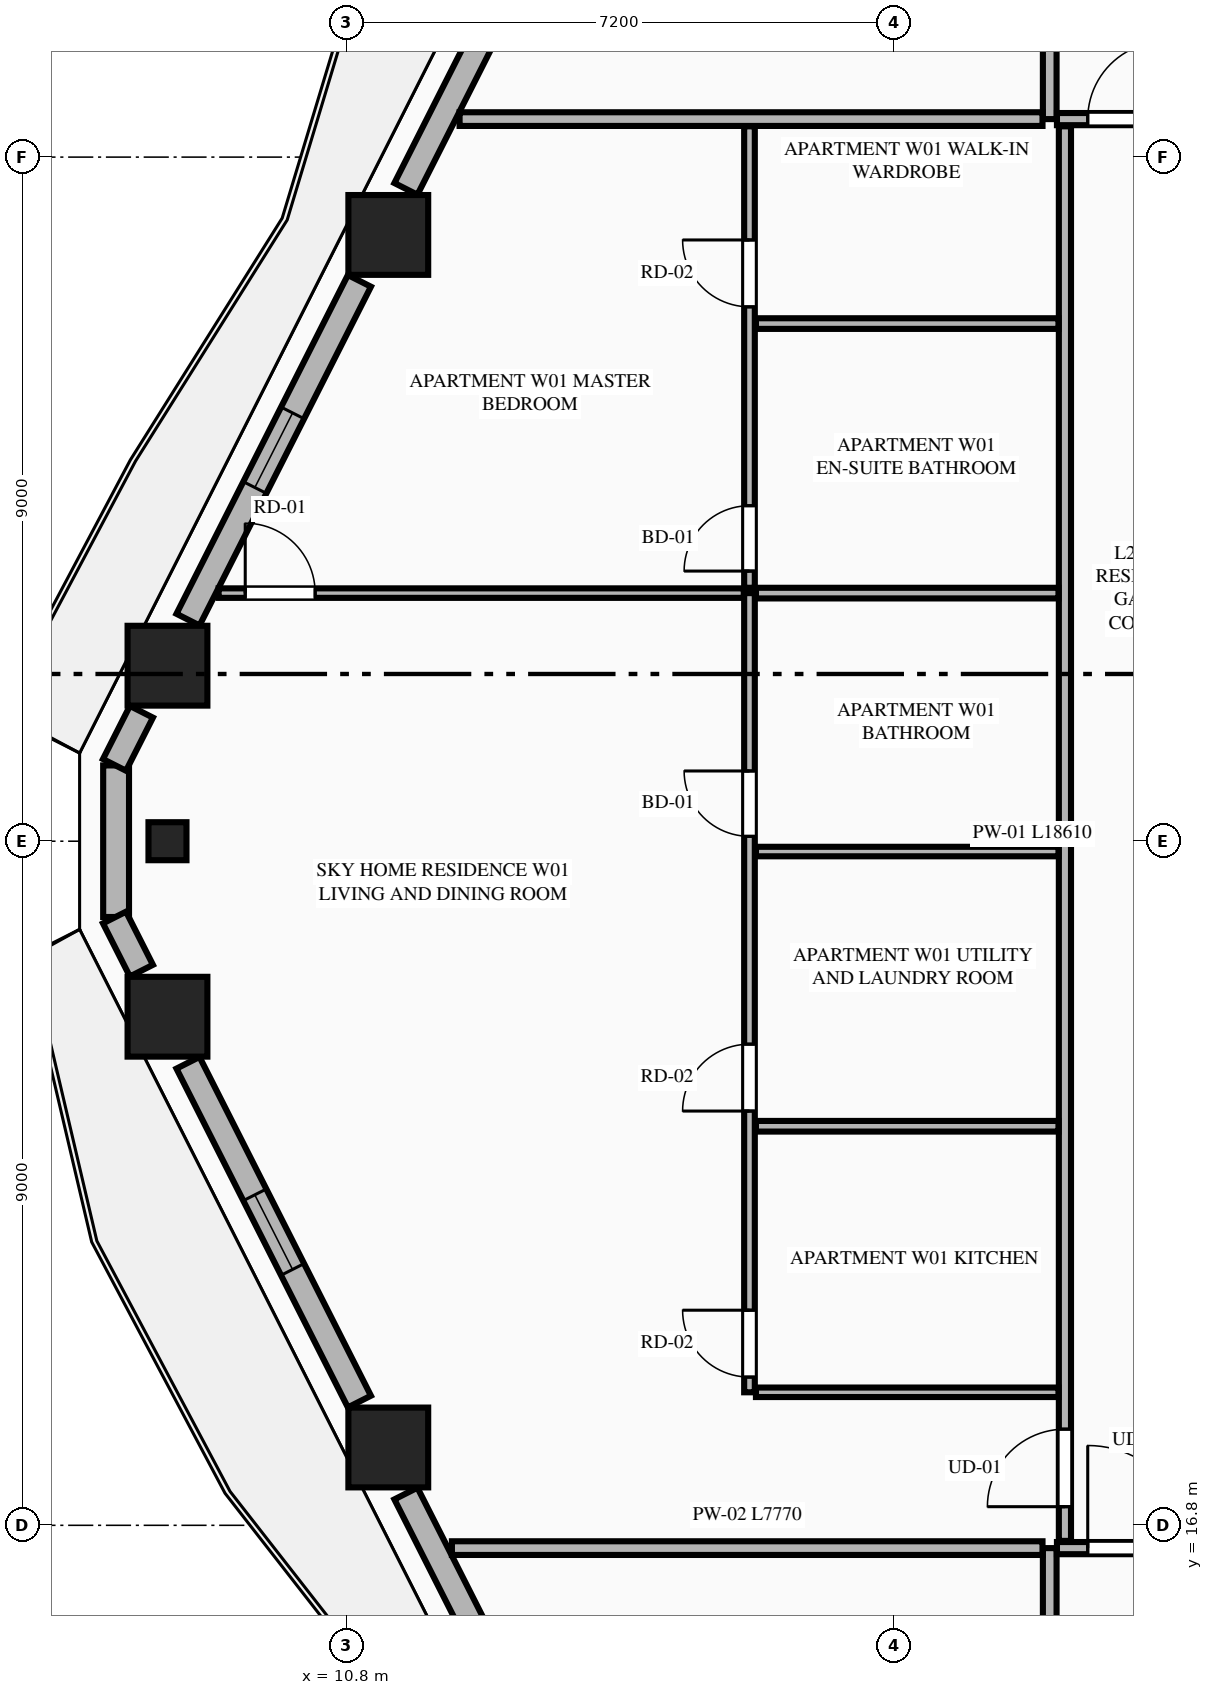
"""IFC4 building model, lengths in metres.
Left out: names, types, materials, properties, quantities, classifications, styles, units other than length and angle.
Written with IfcOpenShell. Run it as: python <this file> out.ifc"""

import sys

from ifc_helpers import new_model, si_unit, direction, frame, frame_2d, origin, origin_2d, place, context, subcontext, project, spatial, rectangle, extrude, element, fill, save


model = new_model("IFC4")
c1 = context("Model", 3, precision=1e-05, world=origin(), true_north=direction((0.0, 1.0)))
c2 = subcontext(c1, "Body", "Model", "MODEL_VIEW")
j1 = project(units=[si_unit("LENGTHUNIT", "METRE"), si_unit("PLANEANGLEUNIT", "RADIAN")], contexts=[c1])
p1 = place(None, origin())
s1 = spatial("IfcSite", under=j1, at=p1, CompositionType="ELEMENT")
p2 = place(p1, origin())
s2 = spatial("IfcBuilding", under=s1, at=p2, CompositionType="ELEMENT")
p3 = place(p2, frame((0.0, 0.0, 105.5)))
s3 = spatial("IfcBuildingStorey", under=s2, at=p3, CompositionType="ELEMENT", Elevation=105.5)
for number, where, z_axis, x_axis in (
    (1, (11.348, 33.776, 0.0), (0.0, 0.0, 1.0), (1.0, 0.0, 0.0)),
    (2, (8.443, 28.109, 0.0), (0.0, 0.0, 1.0), (1.0, 0.0, 0.0)),
    (3, (8.443, 23.491, 0.0), (0.0, 0.0, 1.0), (1.0, 0.0, 0.0)),
    (4, (11.348, 17.824, 0.0), (0.0, 0.0, 1.0), (1.0, 0.0, 0.0)),
):
    element("IfcColumn", number, at=place(p3, frame(where, z_axis=z_axis, x_axis=x_axis)), inside=s3, PredefinedType="COLUMN", context=c2, shape_type="SweptSolid", body=[
        extrude(rectangle(XDim=1.05, YDim=1.05, at=origin_2d()), origin(), (0.0, 0.0, 1.0), 3.55),
    ])
p4 = place(p3, frame((8.443, 25.8, 0.0), z_axis=(0.0, 0.0, 1.0), x_axis=(0.0, -1.0, 0.0)))
e5 = element("IfcColumn", 5, at=p4, inside=s3, PredefinedType="PILASTER", context=c2, shape_type="SweptSolid", body=[
    extrude(rectangle(XDim=0.5, YDim=0.35, at=origin_2d()), origin(), (0.0, 0.0, 1.0), 3.55),
])
p5 = place(p3, frame((7.767, 26.797, 0.0), z_axis=(0.0, 0.0, 1.0), x_axis=(0.0, -1.0, 0.0)))
e6 = element("IfcWall", 6, at=p5, inside=s3, PredefinedType="STANDARD", context=c2, shape_type="SweptSolid", body=[
    extrude(rectangle(XDim=1.994, YDim=0.34, at=frame_2d((0.997, 0.0))), origin(), (0.0, 0.0, 1.0), 3.34),
])
p6 = place(p3, frame((13.937, 39.039, 0.0), z_axis=(0.0, 0.0, 1.0), x_axis=(-0.451567731634, -0.892236842855, 0.0)))
e7 = element("IfcWall", 7, at=p6, inside=s3, PredefinedType="STANDARD", context=c2, shape_type="SweptSolid", body=[
    extrude(rectangle(XDim=5.219, YDim=0.34, at=frame_2d((2.61, 0.0))), origin(), (0.0, 0.0, 1.0), 2.797),
])
p7 = place(p6, frame((1.42, 0.0, 0.0)))
e8 = element("IfcOpeningElement", 8, at=p7, cuts=e7, PredefinedType="OPENING", context=c2, shape_type="SweptSolid", body=[
    extrude(rectangle(XDim=1.1, YDim=2.25, at=frame_2d((0.55, 1.125))), frame((0.0, 0.18, 0.0), z_axis=(0.0, -1.0, 0.0), x_axis=(1.0, 0.0, 0.0)), (0.0, 0.0, 1.0), 0.36),
])
p8 = place(p3, frame((10.968, 33.172, 0.0), z_axis=(0.0, 0.0, 1.0), x_axis=(-0.451470533039, -0.892286029139, 0.0)))
e9 = element("IfcWall", 9, at=p8, inside=s3, PredefinedType="STANDARD", context=c2, shape_type="SweptSolid", body=[
    extrude(rectangle(XDim=4.995, YDim=0.34, at=frame_2d((2.498, 0.0))), origin(), (0.0, 0.0, 1.0), 2.797),
])
p9 = place(p8, frame((1.947, 0.0, 0.75)))
e10 = element("IfcOpeningElement", 10, at=p9, cuts=e9, PredefinedType="OPENING", context=c2, shape_type="SweptSolid", body=[
    extrude(rectangle(XDim=1.1, YDim=1.897, at=frame_2d((0.55, 0.948))), frame((0.0, 0.18, 0.0), z_axis=(0.0, -1.0, 0.0), x_axis=(1.0, 0.0, 0.0)), (0.0, 0.0, 1.0), 0.36),
])
for number, where, z_axis, x_axis in (
    (11, (8.1, 27.503, 0.0), (0.0, 0.0, 1.0), (-0.452, -0.892, 0.0)),
    (12, (7.746, 24.796, 0.0), (0.0, 0.0, 1.0), (0.452, -0.892, 0.0)),
):
    element("IfcWall", number, at=place(p3, frame(where, z_axis=z_axis, x_axis=x_axis)), inside=s3, PredefinedType="STANDARD", context=c2, shape_type="SweptSolid", body=[
        extrude(rectangle(XDim=0.783, YDim=0.34, at=frame_2d((0.392, 0.0))), origin(), (0.0, 0.0, 1.0), 3.34),
    ])
p10 = place(p3, frame((8.713, 22.885, 0.0), z_axis=(0.0, 0.0, 1.0), x_axis=(0.451470533039, -0.892286029139, 0.0)))
e13 = element("IfcWall", 13, at=p10, inside=s3, PredefinedType="STANDARD", context=c2, shape_type="SweptSolid", body=[
    extrude(rectangle(XDim=4.995, YDim=0.34, at=frame_2d((2.498, 0.0))), origin(), (0.0, 0.0, 1.0), 2.797),
])
p11 = place(p10, frame((1.947, 0.0, 0.75)))
e14 = element("IfcOpeningElement", 14, at=p11, cuts=e13, PredefinedType="OPENING", context=c2, shape_type="SweptSolid", body=[
    extrude(rectangle(XDim=1.1, YDim=1.897, at=frame_2d((0.55, 0.948))), frame((0.0, 0.18, 0.0), z_axis=(0.0, -1.0, 0.0), x_axis=(1.0, 0.0, 0.0)), (0.0, 0.0, 1.0), 0.36),
])
p12 = place(p3, frame((11.58, 17.218, 0.0), z_axis=(0.0, 0.0, 1.0), x_axis=(0.451567731634, -0.892236842855, 0.0)))
e15 = element("IfcWall", 15, at=p12, inside=s3, PredefinedType="STANDARD", context=c2, shape_type="SweptSolid", body=[
    extrude(rectangle(XDim=5.219, YDim=0.34, at=frame_2d((2.61, 0.0))), origin(), (0.0, 0.0, 1.0), 2.797),
])
p13 = place(p12, frame((2.587, 0.0, 0.0)))
e16 = element("IfcOpeningElement", 16, at=p13, cuts=e15, PredefinedType="OPENING", context=c2, shape_type="SweptSolid", body=[
    extrude(rectangle(XDim=1.1, YDim=2.25, at=frame_2d((0.55, 1.125))), frame((0.0, 0.18, 0.0), z_axis=(0.0, -1.0, 0.0), x_axis=(1.0, 0.0, 0.0)), (0.0, 0.0, 1.0), 0.36),
])
p14 = place(p3, frame((20.05, 4.105, 0.0), z_axis=(0.0, 0.0, 1.0), x_axis=(0.0, 1.0, 0.0)))
e17 = element("IfcWall", 17, at=p14, inside=s3, PredefinedType="PARTITIONING", context=c2, shape_type="SweptSolid", body=[
    extrude(rectangle(XDim=12.395, YDim=0.18, at=frame_2d((6.198, 0.0))), origin(), (0.0, 0.0, 1.0), 3.34),
])
p15 = place(p3, frame((20.145, 16.5, 0.0), z_axis=(0.0, 0.0, 1.0), x_axis=(1.0, 0.0, 0.0)))
e18 = element("IfcWall", 18, at=p15, inside=s3, PredefinedType="PARTITIONING", context=c2, shape_type="SweptSolid", body=[
    extrude(rectangle(XDim=15.992, YDim=0.16, at=frame_2d((7.996, 0.0))), origin(), (0.0, 0.0, 1.0), 3.34),
])
p16 = place(p15, frame((0.405, 0.0, 0.0)))
e19 = element("IfcOpeningElement", 19, at=p16, cuts=e18, PredefinedType="OPENING", context=c2, shape_type="SweptSolid", body=[
    extrude(rectangle(XDim=1.35, YDim=2.35, at=frame_2d((0.675, 1.175))), frame((0.0, 0.09, 0.0), z_axis=(0.0, -1.0, 0.0), x_axis=(1.0, 0.0, 0.0)), (0.0, 0.0, 1.0), 0.18),
])
p17 = place(p3, frame((20.05, 35.3, 0.0), z_axis=(0.0, 0.0, 1.0), x_axis=(0.0, 1.0, 0.0)))
e20 = element("IfcWall", 20, at=p17, inside=s3, PredefinedType="PARTITIONING", context=c2, shape_type="SweptSolid", body=[
    extrude(rectangle(XDim=12.195, YDim=0.18, at=frame_2d((6.098, 0.0))), origin(), (0.0, 0.0, 1.0), 3.34),
])
p18 = place(p3, frame((20.145, 35.3, 0.0), z_axis=(0.0, 0.0, 1.0), x_axis=(1.0, 0.0, 0.0)))
e21 = element("IfcWall", 21, at=p18, inside=s3, PredefinedType="PARTITIONING", context=c2, shape_type="SweptSolid", body=[
    extrude(rectangle(XDim=8.328, YDim=0.16, at=frame_2d((4.164, 0.0))), origin(), (0.0, 0.0, 1.0), 3.34),
])
p19 = place(p18, frame((0.405, 0.0, 0.0)))
e22 = element("IfcOpeningElement", 22, at=p19, cuts=e21, PredefinedType="OPENING", context=c2, shape_type="SweptSolid", body=[
    extrude(rectangle(XDim=1.02, YDim=2.25, at=frame_2d((0.51, 1.125))), frame((0.0, 0.09, 0.0), z_axis=(0.0, -1.0, 0.0), x_axis=(1.0, 0.0, 0.0)), (0.0, 0.0, 1.0), 0.18),
])
p20 = place(p3, frame((12.185, 16.5, 0.0), z_axis=(0.0, 0.0, 1.0), x_axis=(1.0, 0.0, 0.0)))
e23 = element("IfcWall", 23, at=p20, inside=s3, PredefinedType="PARTITIONING", context=c2, shape_type="SweptSolid", body=[
    extrude(rectangle(XDim=7.77, YDim=0.18, at=frame_2d((3.885, 0.0))), origin(), (0.0, 0.0, 1.0), 3.34),
])
p21 = place(p3, frame((12.286, 35.3, 0.0), z_axis=(0.0, 0.0, 1.0), x_axis=(1.0, 0.0, 0.0)))
e24 = element("IfcWall", 24, at=p21, inside=s3, PredefinedType="PARTITIONING", context=c2, shape_type="SweptSolid", body=[
    extrude(rectangle(XDim=7.669, YDim=0.18, at=frame_2d((3.834, 0.0))), origin(), (0.0, 0.0, 1.0), 3.34),
])
p22 = place(p3, frame((20.25, 16.595, 0.0), z_axis=(0.0, 0.0, 1.0), x_axis=(0.0, 1.0, 0.0)))
e25 = element("IfcWall", 25, at=p22, inside=s3, PredefinedType="PARTITIONING", context=c2, shape_type="SweptSolid", body=[
    extrude(rectangle(XDim=18.61, YDim=0.16, at=frame_2d((9.305, 0.0))), origin(), (0.0, 0.0, 1.0), 3.34),
])
p23 = place(p22, frame((0.45, 0.0, 0.0)))
e26 = element("IfcOpeningElement", 26, at=p23, cuts=e25, PredefinedType="OPENING", context=c2, shape_type="SweptSolid", body=[
    extrude(rectangle(XDim=1.02, YDim=2.25, at=frame_2d((0.51, 1.125))), frame((0.0, 0.09, 0.0), z_axis=(0.0, -1.0, 0.0), x_axis=(1.0, 0.0, 0.0)), (0.0, 0.0, 1.0), 0.18),
])
p24 = place(p3, frame((16.185, 18.55, 0.0), z_axis=(0.0, 0.0, 1.0), x_axis=(1.0, 0.0, 0.0)))
e27 = element("IfcWall", 27, at=p24, inside=s3, PredefinedType="PARTITIONING", context=c2, shape_type="SweptSolid", body=[
    extrude(rectangle(XDim=3.98, YDim=0.125, at=frame_2d((1.99, 0.0))), origin(), (0.0, 0.0, 1.0), 2.722),
])
p25 = place(p3, frame((16.1, 18.55, 0.0), z_axis=(0.0, 0.0, 1.0), x_axis=(0.0, 1.0, 0.0)))
e28 = element("IfcWall", 28, at=p25, inside=s3, PredefinedType="PLUMBINGWALL", context=c2, shape_type="SweptSolid", body=[
    extrude(rectangle(XDim=10.514, YDim=0.14, at=frame_2d((5.257, 0.0))), origin(), (0.0, 0.0, 1.0), 3.34),
])
p26 = place(p25, frame((0.2, 0.0, 0.0)))
e29 = element("IfcOpeningElement", 29, at=p26, cuts=e28, PredefinedType="OPENING", context=c2, shape_type="SweptSolid", body=[
    extrude(rectangle(XDim=0.88, YDim=2.15, at=frame_2d((0.44, 1.075))), frame((0.0, 0.08, 0.0), z_axis=(0.0, -1.0, 0.0), x_axis=(1.0, 0.0, 0.0)), (0.0, 0.0, 1.0), 0.16),
])
p27 = place(p25, frame((3.7, 0.0, 0.0)))
e30 = element("IfcOpeningElement", 30, at=p27, cuts=e28, PredefinedType="OPENING", context=c2, shape_type="SweptSolid", body=[
    extrude(rectangle(XDim=0.88, YDim=2.15, at=frame_2d((0.44, 1.075))), frame((0.0, 0.08, 0.0), z_axis=(0.0, -1.0, 0.0), x_axis=(1.0, 0.0, 0.0)), (0.0, 0.0, 1.0), 0.16),
])
p28 = place(p25, frame((7.314, 0.0, 0.0)))
e31 = element("IfcOpeningElement", 31, at=p28, cuts=e28, PredefinedType="OPENING", context=c2, shape_type="SweptSolid", body=[
    extrude(rectangle(XDim=0.86, YDim=2.1, at=frame_2d((0.43, 1.05))), frame((0.0, 0.08, 0.0), z_axis=(0.0, -1.0, 0.0), x_axis=(1.0, 0.0, 0.0)), (0.0, 0.0, 1.0), 0.16),
])
p29 = place(p3, frame((16.1, 29.134, 0.0), z_axis=(0.0, 0.0, 1.0), x_axis=(0.0, 1.0, 0.0)))
e32 = element("IfcWall", 32, at=p29, inside=s3, PredefinedType="PLUMBINGWALL", context=c2, shape_type="SweptSolid", body=[
    extrude(rectangle(XDim=6.071, YDim=0.14, at=frame_2d((3.036, 0.0))), origin(), (0.0, 0.0, 1.0), 3.34),
])
p30 = place(p29, frame((0.22, 0.0, 0.0)))
e33 = element("IfcOpeningElement", 33, at=p30, cuts=e32, PredefinedType="OPENING", context=c2, shape_type="SweptSolid", body=[
    extrude(rectangle(XDim=0.86, YDim=2.1, at=frame_2d((0.43, 1.05))), frame((0.0, 0.08, 0.0), z_axis=(0.0, -1.0, 0.0), x_axis=(1.0, 0.0, 0.0)), (0.0, 0.0, 1.0), 0.16),
])
p31 = place(p29, frame((3.696, 0.0, 0.0)))
e34 = element("IfcOpeningElement", 34, at=p31, cuts=e32, PredefinedType="OPENING", context=c2, shape_type="SweptSolid", body=[
    extrude(rectangle(XDim=0.88, YDim=2.15, at=frame_2d((0.44, 1.075))), frame((0.0, 0.08, 0.0), z_axis=(0.0, -1.0, 0.0), x_axis=(1.0, 0.0, 0.0)), (0.0, 0.0, 1.0), 0.16),
])
p32 = place(p3, frame((16.185, 29.064, 0.0), z_axis=(0.0, 0.0, 1.0), x_axis=(1.0, 0.0, 0.0)))
e35 = element("IfcWall", 35, at=p32, inside=s3, PredefinedType="PLUMBINGWALL", context=c2, shape_type="SweptSolid", body=[
    extrude(rectangle(XDim=3.98, YDim=0.14, at=frame_2d((1.99, 0.0))), origin(), (0.0, 0.0, 1.0), 3.34),
])
p33 = place(p3, frame((9.116, 29.064, 0.0), z_axis=(0.0, 0.0, 1.0), x_axis=(1.0, 0.0, 0.0)))
e36 = element("IfcWall", 36, at=p33, inside=s3, PredefinedType="PARTITIONING", context=c2, shape_type="SweptSolid", body=[
    extrude(rectangle(XDim=6.909, YDim=0.125, at=frame_2d((3.455, 0.0))), origin(), (0.0, 0.0, 1.0), 3.34),
])
p34 = place(p33, frame((0.35, 0.0, 0.0)))
e37 = element("IfcOpeningElement", 37, at=p34, cuts=e36, PredefinedType="OPENING", context=c2, shape_type="SweptSolid", body=[
    extrude(rectangle(XDim=0.92, YDim=2.15, at=frame_2d((0.46, 1.075))), frame((0.0, 0.073, 0.0), z_axis=(0.0, -1.0, 0.0), x_axis=(1.0, 0.0, 0.0)), (0.0, 0.0, 1.0), 0.145),
])
p35 = place(p3, frame((16.185, 22.05, 0.0), z_axis=(0.0, 0.0, 1.0), x_axis=(1.0, 0.0, 0.0)))
e38 = element("IfcWall", 38, at=p35, inside=s3, PredefinedType="PLUMBINGWALL", context=c2, shape_type="SweptSolid", body=[
    extrude(rectangle(XDim=3.98, YDim=0.14, at=frame_2d((1.99, 0.0))), origin(), (0.0, 0.0, 1.0), 3.34),
])
p36 = place(p3, frame((16.185, 25.664, 0.0), z_axis=(0.0, 0.0, 1.0), x_axis=(1.0, 0.0, 0.0)))
e39 = element("IfcWall", 39, at=p36, inside=s3, PredefinedType="PARTITIONING", context=c2, shape_type="SweptSolid", body=[
    extrude(rectangle(XDim=3.98, YDim=0.125, at=frame_2d((1.99, 0.0))), origin(), (0.0, 0.0, 1.0), 3.34),
])
p37 = place(p3, frame((16.185, 32.61, 0.0), z_axis=(0.0, 0.0, 1.0), x_axis=(1.0, 0.0, 0.0)))
e40 = element("IfcWall", 40, at=p37, inside=s3, PredefinedType="PLUMBINGWALL", context=c2, shape_type="SweptSolid", body=[
    extrude(rectangle(XDim=3.98, YDim=0.14, at=frame_2d((1.99, 0.0))), origin(), (0.0, 0.0, 1.0), 3.34),
])
p38 = place(p9, origin())
e41 = element("IfcWindow", 41, at=p38, inside=s3, PartitioningType="SINGLE_PANEL", PredefinedType="WINDOW", context=c2, shape_type="SweptSolid", body=[
    extrude(rectangle(XDim=1.1, YDim=1.897, at=frame_2d((0.55, 0.948))), frame((0.0, 0.03, 0.0), z_axis=(0.0, -1.0, 0.0), x_axis=(1.0, 0.0, 0.0)), (0.0, 0.0, 1.0), 0.06),
])
fill(e10, e41)
p39 = place(p11, origin())
e42 = element("IfcWindow", 42, at=p39, inside=s3, PartitioningType="SINGLE_PANEL", PredefinedType="WINDOW", context=c2, shape_type="SweptSolid", body=[
    extrude(rectangle(XDim=1.1, YDim=1.897, at=frame_2d((0.55, 0.948))), frame((0.0, 0.03, 0.0), z_axis=(0.0, -1.0, 0.0), x_axis=(1.0, 0.0, 0.0)), (0.0, 0.0, 1.0), 0.06),
])
fill(e14, e42)
p40 = place(p16, origin())
e43 = element("IfcDoor", 43, at=p40, inside=s3, OperationType="SINGLE_SWING_LEFT", PredefinedType="DOOR", context=c2, shape_type="SweptSolid", body=[
    extrude(rectangle(XDim=1.35, YDim=2.35, at=frame_2d((0.675, 1.175))), frame((0.0, 0.025, 0.0), z_axis=(0.0, -1.0, 0.0), x_axis=(1.0, 0.0, 0.0)), (0.0, 0.0, 1.0), 0.05),
])
fill(e19, e43)
p41 = place(p19, origin())
e44 = element("IfcDoor", 44, at=p41, inside=s3, OperationType="SINGLE_SWING_RIGHT", PredefinedType="DOOR", context=c2, shape_type="SweptSolid", body=[
    extrude(rectangle(XDim=1.02, YDim=2.25, at=frame_2d((0.51, 1.125))), frame((0.0, 0.025, 0.0), z_axis=(0.0, -1.0, 0.0), x_axis=(1.0, 0.0, 0.0)), (0.0, 0.0, 1.0), 0.05),
])
fill(e22, e44)
p42 = place(p26, origin())
e45 = element("IfcDoor", 45, at=p42, inside=s3, OperationType="SINGLE_SWING_RIGHT", PredefinedType="DOOR", context=c2, shape_type="SweptSolid", body=[
    extrude(rectangle(XDim=0.88, YDim=2.15, at=frame_2d((0.44, 1.075))), frame((0.0, 0.025, 0.0), z_axis=(0.0, -1.0, 0.0), x_axis=(1.0, 0.0, 0.0)), (0.0, 0.0, 1.0), 0.05),
])
fill(e29, e45)
p43 = place(p27, origin())
e46 = element("IfcDoor", 46, at=p43, inside=s3, OperationType="SINGLE_SWING_LEFT", PredefinedType="DOOR", context=c2, shape_type="SweptSolid", body=[
    extrude(rectangle(XDim=0.88, YDim=2.15, at=frame_2d((0.44, 1.075))), frame((0.0, 0.025, 0.0), z_axis=(0.0, -1.0, 0.0), x_axis=(1.0, 0.0, 0.0)), (0.0, 0.0, 1.0), 0.05),
])
fill(e30, e46)
p44 = place(p28, origin())
e47 = element("IfcDoor", 47, at=p44, inside=s3, OperationType="SINGLE_SWING_RIGHT", PredefinedType="DOOR", context=c2, shape_type="SweptSolid", body=[
    extrude(rectangle(XDim=0.86, YDim=2.1, at=frame_2d((0.43, 1.05))), frame((0.0, 0.025, 0.0), z_axis=(0.0, -1.0, 0.0), x_axis=(1.0, 0.0, 0.0)), (0.0, 0.0, 1.0), 0.05),
])
fill(e31, e47)
p45 = place(p30, origin())
e48 = element("IfcDoor", 48, at=p45, inside=s3, OperationType="SINGLE_SWING_LEFT", PredefinedType="DOOR", context=c2, shape_type="SweptSolid", body=[
    extrude(rectangle(XDim=0.86, YDim=2.1, at=frame_2d((0.43, 1.05))), frame((0.0, 0.025, 0.0), z_axis=(0.0, -1.0, 0.0), x_axis=(1.0, 0.0, 0.0)), (0.0, 0.0, 1.0), 0.05),
])
fill(e33, e48)
p46 = place(p31, origin())
e49 = element("IfcDoor", 49, at=p46, inside=s3, OperationType="SINGLE_SWING_RIGHT", PredefinedType="DOOR", context=c2, shape_type="SweptSolid", body=[
    extrude(rectangle(XDim=0.88, YDim=2.15, at=frame_2d((0.44, 1.075))), frame((0.0, 0.025, 0.0), z_axis=(0.0, -1.0, 0.0), x_axis=(1.0, 0.0, 0.0)), (0.0, 0.0, 1.0), 0.05),
])
fill(e34, e49)
p47 = place(p23, origin())
e50 = element("IfcDoor", 50, at=p47, inside=s3, OperationType="SINGLE_SWING_LEFT", PredefinedType="DOOR", context=c2, shape_type="SweptSolid", body=[
    extrude(rectangle(XDim=1.02, YDim=2.25, at=frame_2d((0.51, 1.125))), frame((0.0, 0.025, 0.0), z_axis=(0.0, -1.0, 0.0), x_axis=(1.0, 0.0, 0.0)), (0.0, 0.0, 1.0), 0.05),
])
fill(e26, e50)
p48 = place(p34, origin())
e51 = element("IfcDoor", 51, at=p48, inside=s3, OperationType="SINGLE_SWING_LEFT", PredefinedType="DOOR", context=c2, shape_type="SweptSolid", body=[
    extrude(rectangle(XDim=0.92, YDim=2.15, at=frame_2d((0.46, 1.075))), frame((0.0, 0.025, 0.0), z_axis=(0.0, -1.0, 0.0), x_axis=(1.0, 0.0, 0.0)), (0.0, 0.0, 1.0), 0.05),
])
fill(e37, e51)
save(model, sys.argv[1])
